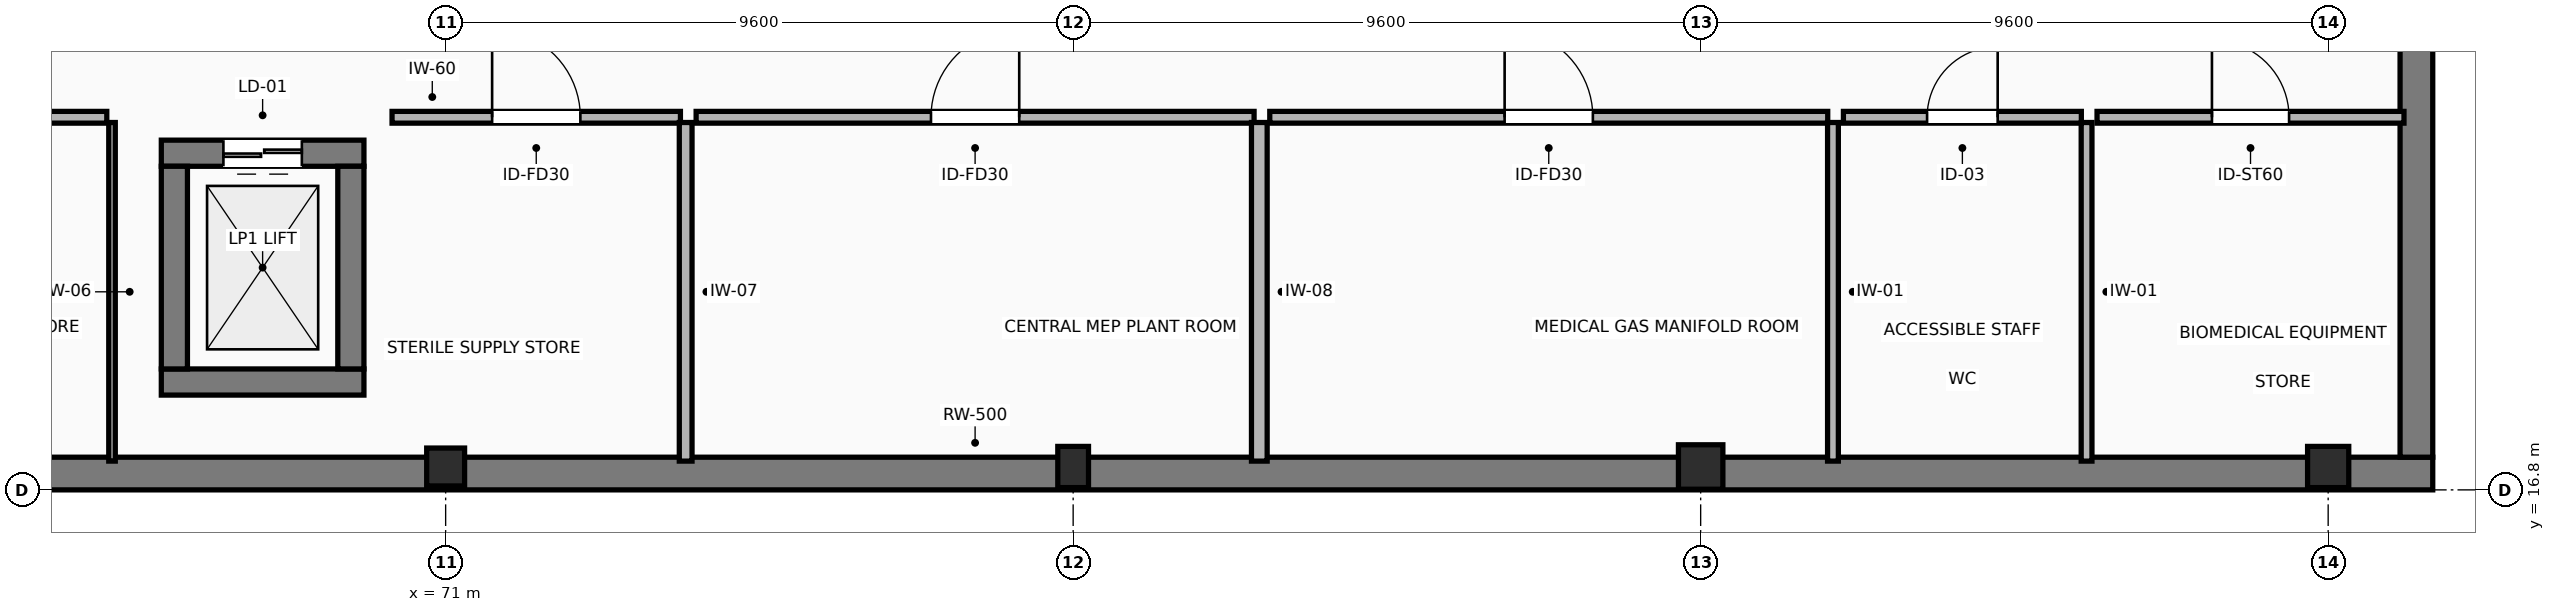
"""IFC4 building model, lengths in metres.
Left out: names, types, materials, properties, quantities, classifications, styles, units other than length and angle.
Written with IfcOpenShell. Run it as: python <this file> out.ifc"""

import sys

from ifc_helpers import new_model, si_unit, direction, frame, frame_2d, origin, origin_2d, place, context, subcontext, project, spatial, rectangle, extrude, element, fill, save


model = new_model("IFC4")
c1 = context("Model", 3, precision=1e-05, world=origin(), true_north=direction((0.0, 1.0)))
c2 = subcontext(c1, "Body", "Model", "MODEL_VIEW")
j1 = project(units=[si_unit("LENGTHUNIT", "METRE"), si_unit("PLANEANGLEUNIT", "RADIAN")], contexts=[c1])
p1 = place(None, origin())
s1 = spatial("IfcSite", under=j1, at=p1, CompositionType="ELEMENT")
p2 = place(p1, origin())
s2 = spatial("IfcBuilding", under=s1, at=p2, CompositionType="ELEMENT")
p3 = place(p2, frame((0.0, 0.0, -4.5)))
s3 = spatial("IfcBuildingStorey", under=s2, at=p3, CompositionType="ELEMENT", Elevation=-4.5)
p4 = place(p3, frame((71.0, 17.15, -0.55), z_axis=(0.0, 0.0, 1.0), x_axis=(1.0, 0.0, 0.0)))
e1 = element("IfcColumn", 1, at=p4, inside=s3, PredefinedType="COLUMN", context=c2, shape_type="SweptSolid", body=[
    extrude(rectangle(XDim=0.58, YDim=0.58, at=origin_2d()), origin(), (0.0, 0.0, 1.0), 5.05),
])
p5 = place(p3, frame((80.6, 17.15, -0.55), z_axis=(0.0, 0.0, 1.0), x_axis=(1.0, 0.0, 0.0)))
e2 = element("IfcColumn", 2, at=p5, inside=s3, PredefinedType="COLUMN", context=c2, shape_type="SweptSolid", body=[
    extrude(rectangle(XDim=0.47, YDim=0.63, at=origin_2d()), origin(), (0.0, 0.0, 1.0), 5.05),
])
p6 = place(p3, frame((90.2, 17.15, -0.55), z_axis=(0.0, 0.0, 1.0), x_axis=(1.0, 0.0, 0.0)))
e3 = element("IfcColumn", 3, at=p6, inside=s3, PredefinedType="COLUMN", context=c2, shape_type="SweptSolid", body=[
    extrude(rectangle(XDim=0.68, YDim=0.68, at=origin_2d()), origin(), (0.0, 0.0, 1.0), 5.05),
])
p7 = place(p3, frame((99.8, 17.15, -0.55), z_axis=(0.0, 0.0, 1.0), x_axis=(1.0, 0.0, 0.0)))
e4 = element("IfcColumn", 4, at=p7, inside=s3, PredefinedType="COLUMN", context=c2, shape_type="SweptSolid", body=[
    extrude(rectangle(XDim=0.63, YDim=0.63, at=origin_2d()), origin(), (0.0, 0.0, 1.0), 5.05),
])
p8 = place(p3, frame((56.8, 17.05, 0.0), z_axis=(0.0, 0.0, 1.0), x_axis=(1.0, 0.0, 0.0)))
e5 = element("IfcWall", 5, at=p8, inside=s3, PredefinedType="SHEAR", context=c2, shape_type="SweptSolid", body=[
    extrude(rectangle(XDim=44.6, YDim=0.5, at=frame_2d((22.3, 0.0))), origin(), (0.0, 0.0, 1.0), 4.22),
])
p9 = place(p3, frame((101.15, 34.1, 0.0), z_axis=(0.0, 0.0, 1.0), x_axis=(0.0, -1.0, 0.0)))
e6 = element("IfcWall", 6, at=p9, inside=s3, PredefinedType="SHEAR", context=c2, shape_type="SweptSolid", body=[
    extrude(rectangle(XDim=16.8, YDim=0.5, at=frame_2d((8.4, 0.0))), origin(), (0.0, 0.0, 1.0), 4.22),
])
p10 = place(p3, frame((66.65, 18.45, -0.55), z_axis=(0.0, 0.0, 1.0), x_axis=(1.0, 0.0, 0.0)))
e7 = element("IfcWall", 7, at=p10, inside=s3, PredefinedType="SHEAR", context=c2, shape_type="SweptSolid", body=[
    extrude(rectangle(XDim=3.1, YDim=0.4, at=frame_2d((1.55, 0.0))), origin(), (0.0, 0.0, 1.0), 5.05),
])
p11 = place(p3, frame((69.75, 21.95, -0.55), z_axis=(0.0, 0.0, 1.0), x_axis=(-1.0, 0.0, 0.0)))
e8 = element("IfcWall", 8, at=p11, inside=s3, PredefinedType="SHEAR", context=c2, shape_type="SweptSolid", body=[
    extrude(rectangle(XDim=3.1, YDim=0.4, at=frame_2d((1.55, 0.0))), origin(), (0.0, 0.0, 1.0), 5.05),
])
p12 = place(p11, frame((0.95, 0.0, 0.55)))
e9 = element("IfcOpeningElement", 9, at=p12, cuts=e8, PredefinedType="OPENING", context=c2, shape_type="SweptSolid", body=[
    extrude(rectangle(XDim=1.2, YDim=2.2, at=frame_2d((0.6, 1.1))), frame((0.0, 0.21, 0.0), z_axis=(0.0, -1.0, 0.0), x_axis=(1.0, 0.0, 0.0)), (0.0, 0.0, 1.0), 0.42),
])
for number, where, z_axis, x_axis in (
    (10, (66.85, 18.65, -0.55), (0.0, 0.0, 1.0), (0.0, 1.0, 0.0)),
    (11, (69.55, 21.75, -0.55), (0.0, 0.0, 1.0), (0.0, -1.0, 0.0)),
):
    element("IfcWall", number, at=place(p3, frame(where, z_axis=z_axis, x_axis=x_axis)), inside=s3, PredefinedType="SHEAR", context=c2, shape_type="SweptSolid", body=[
        extrude(rectangle(XDim=3.1, YDim=0.4, at=frame_2d((1.55, 0.0))), origin(), (0.0, 0.0, 1.0), 5.05),
    ])
p13 = place(p3, frame((57.24, 22.5, 0.0), z_axis=(0.0, 0.0, 1.0), x_axis=(1.0, 0.0, 0.0)))
e12 = element("IfcWall", 12, at=p13, inside=s3, PredefinedType="PARTITIONING", context=c2, shape_type="SweptSolid", body=[
    extrude(rectangle(XDim=8.576, YDim=0.18, at=frame_2d((4.288, 0.0))), origin(), (0.0, 0.0, 1.0), 4.22),
])
p14 = place(p13, frame((3.613, 0.0, 0.0)))
e13 = element("IfcOpeningElement", 13, at=p14, cuts=e12, PredefinedType="OPENING", context=c2, shape_type="SweptSolid", body=[
    extrude(rectangle(XDim=1.35, YDim=2.2, at=frame_2d((0.675, 1.1))), frame((0.0, 0.1, 0.0), z_axis=(0.0, -1.0, 0.0), x_axis=(1.0, 0.0, 0.0)), (0.0, 0.0, 1.0), 0.2),
])
p15 = place(p3, frame((65.896, 22.42, 0.0), z_axis=(0.0, 0.0, 1.0), x_axis=(0.0, -1.0, 0.0)))
e14 = element("IfcWall", 14, at=p15, inside=s3, PredefinedType="PARTITIONING", context=c2, shape_type="SweptSolid", body=[
    extrude(rectangle(XDim=5.18, YDim=0.1, at=frame_2d((2.59, 0.0))), origin(), (0.0, 0.0, 1.0), 4.22),
])
p16 = place(p3, frame((70.18, 22.5, 0.0), z_axis=(0.0, 0.0, 1.0), x_axis=(1.0, 0.0, 0.0)))
e15 = element("IfcWall", 15, at=p16, inside=s3, PredefinedType="PARTITIONING", context=c2, shape_type="SweptSolid", body=[
    extrude(rectangle(XDim=4.412, YDim=0.18, at=frame_2d((2.206, 0.0))), origin(), (0.0, 0.0, 1.0), 4.22),
])
p17 = place(p16, frame((1.531, 0.0, 0.0)))
e16 = element("IfcOpeningElement", 16, at=p17, cuts=e15, PredefinedType="OPENING", context=c2, shape_type="SweptSolid", body=[
    extrude(rectangle(XDim=1.35, YDim=2.2, at=frame_2d((0.675, 1.1))), frame((0.0, 0.1, 0.0), z_axis=(0.0, -1.0, 0.0), x_axis=(1.0, 0.0, 0.0)), (0.0, 0.0, 1.0), 0.2),
])
p18 = place(p3, frame((74.672, 22.42, 0.0), z_axis=(0.0, 0.0, 1.0), x_axis=(0.0, -1.0, 0.0)))
e17 = element("IfcWall", 17, at=p18, inside=s3, PredefinedType="PARTITIONING", context=c2, shape_type="SweptSolid", body=[
    extrude(rectangle(XDim=5.18, YDim=0.195, at=frame_2d((2.59, 0.0))), origin(), (0.0, 0.0, 1.0), 3.953),
])
p19 = place(p3, frame((74.832, 22.5, 0.0), z_axis=(0.0, 0.0, 1.0), x_axis=(1.0, 0.0, 0.0)))
e18 = element("IfcWall", 18, at=p19, inside=s3, PredefinedType="PARTITIONING", context=c2, shape_type="SweptSolid", body=[
    extrude(rectangle(XDim=8.536, YDim=0.18, at=frame_2d((4.268, 0.0))), origin(), (0.0, 0.0, 1.0), 4.22),
])
p20 = place(p19, frame((3.593, 0.0, 0.0)))
e19 = element("IfcOpeningElement", 19, at=p20, cuts=e18, PredefinedType="OPENING", context=c2, shape_type="SweptSolid", body=[
    extrude(rectangle(XDim=1.35, YDim=2.2, at=frame_2d((0.675, 1.1))), frame((0.0, 0.1, 0.0), z_axis=(0.0, -1.0, 0.0), x_axis=(1.0, 0.0, 0.0)), (0.0, 0.0, 1.0), 0.2),
])
p21 = place(p3, frame((83.448, 22.42, 0.0), z_axis=(0.0, 0.0, 1.0), x_axis=(0.0, -1.0, 0.0)))
e20 = element("IfcWall", 20, at=p21, inside=s3, PredefinedType="PARTITIONING", context=c2, shape_type="SweptSolid", body=[
    extrude(rectangle(XDim=5.18, YDim=0.24, at=frame_2d((2.59, 0.0))), origin(), (0.0, 0.0, 1.0), 4.22),
])
p22 = place(p3, frame((83.608, 22.5, 0.0), z_axis=(0.0, 0.0, 1.0), x_axis=(1.0, 0.0, 0.0)))
e21 = element("IfcWall", 21, at=p22, inside=s3, PredefinedType="PARTITIONING", context=c2, shape_type="SweptSolid", body=[
    extrude(rectangle(XDim=8.536, YDim=0.18, at=frame_2d((4.268, 0.0))), origin(), (0.0, 0.0, 1.0), 4.22),
])
p23 = place(p22, frame((3.593, 0.0, 0.0)))
e22 = element("IfcOpeningElement", 22, at=p23, cuts=e21, PredefinedType="OPENING", context=c2, shape_type="SweptSolid", body=[
    extrude(rectangle(XDim=1.35, YDim=2.2, at=frame_2d((0.675, 1.1))), frame((0.0, 0.1, 0.0), z_axis=(0.0, -1.0, 0.0), x_axis=(1.0, 0.0, 0.0)), (0.0, 0.0, 1.0), 0.2),
])
for number, where, z_axis, x_axis in (
    (23, (92.224, 22.42, 0.0), (0.0, 0.0, 1.0), (0.0, -1.0, 0.0)),
    (24, (96.104, 22.42, 0.0), (0.0, 0.0, 1.0), (0.0, -1.0, 0.0)),
):
    element("IfcWall", number, at=place(p3, frame(where, z_axis=z_axis, x_axis=x_axis)), inside=s3, PredefinedType="PARTITIONING", context=c2, shape_type="SweptSolid", body=[
        extrude(rectangle(XDim=5.18, YDim=0.165, at=frame_2d((2.59, 0.0))), origin(), (0.0, 0.0, 1.0), 4.22),
    ])
p24 = place(p3, frame((92.384, 22.5, 0.0), z_axis=(0.0, 0.0, 1.0), x_axis=(1.0, 0.0, 0.0)))
e25 = element("IfcWall", 25, at=p24, inside=s3, PredefinedType="PARTITIONING", context=c2, shape_type="SweptSolid", body=[
    extrude(rectangle(XDim=3.64, YDim=0.18, at=frame_2d((1.82, 0.0))), origin(), (0.0, 0.0, 1.0), 4.22),
])
p25 = place(p24, frame((1.28, 0.0, 0.0)))
e26 = element("IfcOpeningElement", 26, at=p25, cuts=e25, PredefinedType="OPENING", context=c2, shape_type="SweptSolid", body=[
    extrude(rectangle(XDim=1.08, YDim=2.2, at=frame_2d((0.54, 1.1))), frame((0.0, 0.1, 0.0), z_axis=(0.0, -1.0, 0.0), x_axis=(1.0, 0.0, 0.0)), (0.0, 0.0, 1.0), 0.2),
])
p26 = place(p3, frame((96.264, 22.5, 0.0), z_axis=(0.0, 0.0, 1.0), x_axis=(1.0, 0.0, 0.0)))
e27 = element("IfcWall", 27, at=p26, inside=s3, PredefinedType="PARTITIONING", context=c2, shape_type="SweptSolid", body=[
    extrude(rectangle(XDim=4.696, YDim=0.18, at=frame_2d((2.348, 0.0))), origin(), (0.0, 0.0, 1.0), 4.22),
])
p27 = place(p26, frame((1.758, 0.0, 0.0)))
e28 = element("IfcOpeningElement", 28, at=p27, cuts=e27, PredefinedType="OPENING", context=c2, shape_type="SweptSolid", body=[
    extrude(rectangle(XDim=1.18, YDim=2.18, at=frame_2d((0.59, 1.09))), frame((0.0, 0.1, 0.0), z_axis=(0.0, -1.0, 0.0), x_axis=(1.0, 0.0, 0.0)), (0.0, 0.0, 1.0), 0.2),
])
p28 = place(p12, origin())
e29 = element("IfcDoor", 29, at=p28, inside=s3, OperationType="DOUBLE_DOOR_SLIDING", PredefinedType="DOOR", context=c2, shape_type="SweptSolid", body=[
    extrude(rectangle(XDim=1.2, YDim=2.2, at=frame_2d((0.6, 1.1))), frame((0.0, 0.025, 0.0), z_axis=(0.0, -1.0, 0.0), x_axis=(1.0, 0.0, 0.0)), (0.0, 0.0, 1.0), 0.05),
])
fill(e9, e29)
p29 = place(p17, origin())
e30 = element("IfcDoor", 30, at=p29, inside=s3, OperationType="SINGLE_SWING_LEFT", PredefinedType="DOOR", context=c2, shape_type="SweptSolid", body=[
    extrude(rectangle(XDim=1.35, YDim=2.2, at=frame_2d((0.675, 1.1))), frame((0.0, 0.025, 0.0), z_axis=(0.0, -1.0, 0.0), x_axis=(1.0, 0.0, 0.0)), (0.0, 0.0, 1.0), 0.05),
])
fill(e16, e30)
p30 = place(p20, origin())
e31 = element("IfcDoor", 31, at=p30, inside=s3, OperationType="SINGLE_SWING_RIGHT", PredefinedType="DOOR", context=c2, shape_type="SweptSolid", body=[
    extrude(rectangle(XDim=1.35, YDim=2.2, at=frame_2d((0.675, 1.1))), frame((0.0, 0.025, 0.0), z_axis=(0.0, -1.0, 0.0), x_axis=(1.0, 0.0, 0.0)), (0.0, 0.0, 1.0), 0.05),
])
fill(e19, e31)
p31 = place(p23, origin())
e32 = element("IfcDoor", 32, at=p31, inside=s3, OperationType="SINGLE_SWING_LEFT", PredefinedType="DOOR", context=c2, shape_type="SweptSolid", body=[
    extrude(rectangle(XDim=1.35, YDim=2.2, at=frame_2d((0.675, 1.1))), frame((0.0, 0.025, 0.0), z_axis=(0.0, -1.0, 0.0), x_axis=(1.0, 0.0, 0.0)), (0.0, 0.0, 1.0), 0.05),
])
fill(e22, e32)
p32 = place(p25, origin())
e33 = element("IfcDoor", 33, at=p32, inside=s3, OperationType="SINGLE_SWING_RIGHT", PredefinedType="DOOR", context=c2, shape_type="SweptSolid", body=[
    extrude(rectangle(XDim=1.08, YDim=2.2, at=frame_2d((0.54, 1.1))), frame((0.0, 0.025, 0.0), z_axis=(0.0, -1.0, 0.0), x_axis=(1.0, 0.0, 0.0)), (0.0, 0.0, 1.0), 0.05),
])
fill(e26, e33)
p33 = place(p27, origin())
e34 = element("IfcDoor", 34, at=p33, inside=s3, OperationType="SINGLE_SWING_LEFT", PredefinedType="DOOR", context=c2, shape_type="SweptSolid", body=[
    extrude(rectangle(XDim=1.18, YDim=2.18, at=frame_2d((0.59, 1.09))), frame((0.0, 0.025, 0.0), z_axis=(0.0, -1.0, 0.0), x_axis=(1.0, 0.0, 0.0)), (0.0, 0.0, 1.0), 0.05),
])
fill(e28, e34)
save(model, sys.argv[1])
